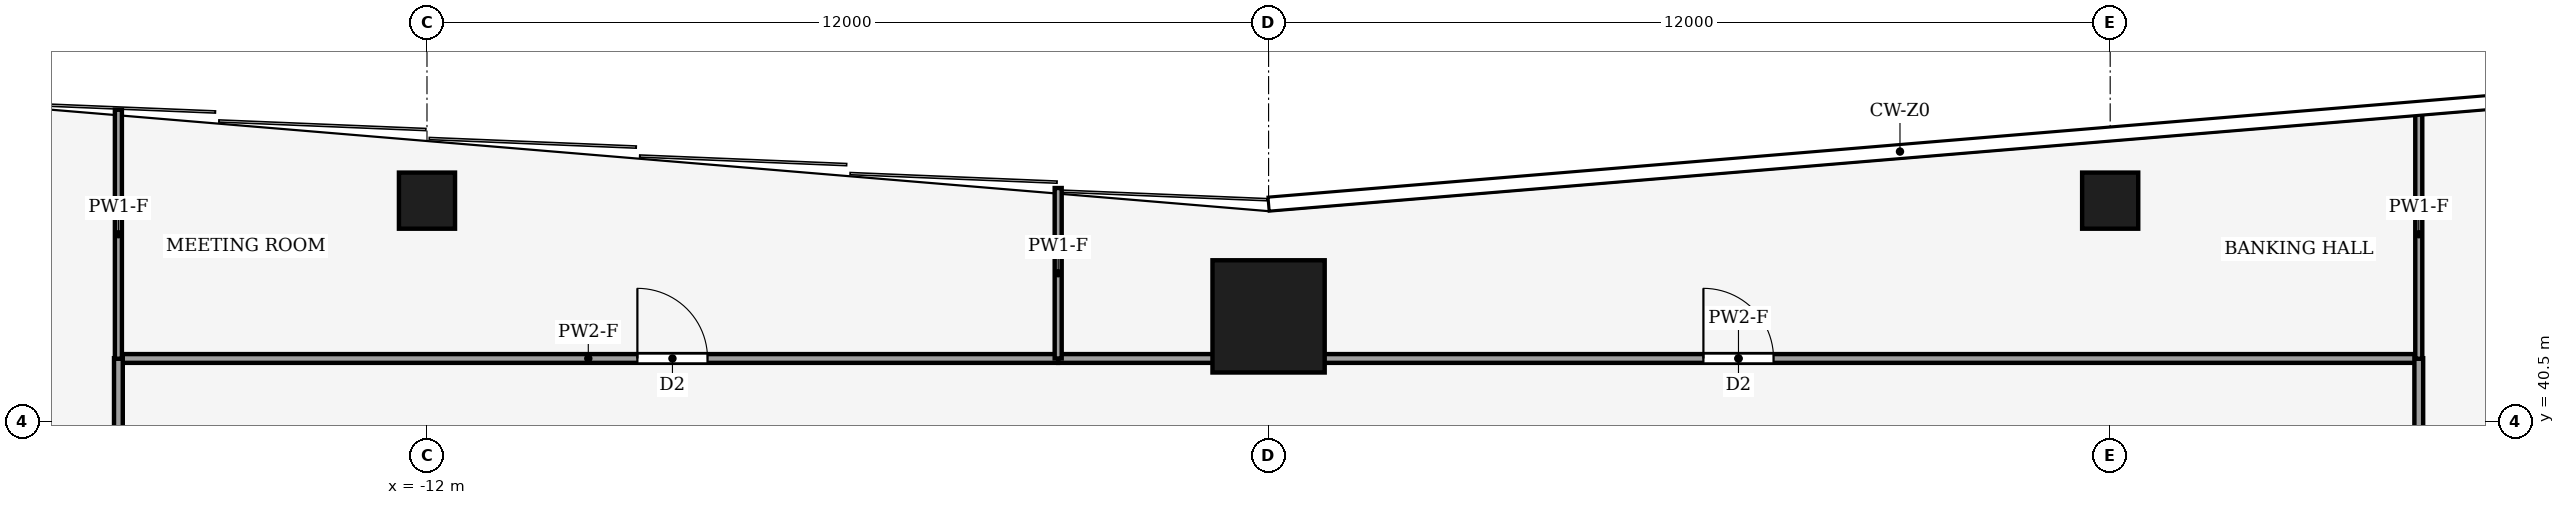
"""IFC4 building model, lengths in metres.
Left out: names, types, materials, properties, quantities, classifications, styles, units other than length and angle.
Written with IfcOpenShell. Run it as: python <this file> out.ifc"""

import sys

from ifc_helpers import new_model, si_unit, direction, frame, frame_2d, origin, origin_2d, place, context, subcontext, project, spatial, rectangle, hollow_rectangle, extrude, element, fill, save


model = new_model("IFC4")
c1 = context("Model", 3, precision=1e-05, world=origin(), true_north=direction((0.0, 1.0)))
c2 = subcontext(c1, "Body", "Model", "MODEL_VIEW")
j1 = project(units=[si_unit("LENGTHUNIT", "METRE"), si_unit("PLANEANGLEUNIT", "RADIAN")], contexts=[c1])
p1 = place(None, origin())
s1 = spatial("IfcSite", under=j1, at=p1, CompositionType="ELEMENT")
p2 = place(p1, origin())
s2 = spatial("IfcBuilding", under=s1, at=p2, CompositionType="ELEMENT")
p3 = place(p2, frame((0.0, 0.0, 22.0)))
s3 = spatial("IfcBuildingStorey", under=s2, at=p3, CompositionType="ELEMENT", Elevation=22.0)
p4 = place(p3, frame((0.0, 42.0, 0.0), z_axis=(0.0, 0.0, 1.0), x_axis=(1.0, 0.0, 0.0)))
e1 = element("IfcColumn", 1, at=p4, inside=s3, PredefinedType="COLUMN", context=c2, shape_type="SweptSolid", body=[
    extrude(hollow_rectangle(XDim=1.6, YDim=1.6, WallThickness=0.09, at=origin_2d()), origin(), (0.0, 0.0, 1.0), 4.0),
])
for number, where, z_axis, x_axis in (
    (2, (-12.0, 43.65, 0.0), (0.0, 0.0, 1.0), (1.0, 0.0, 0.0)),
    (3, (12.0, 43.65, 0.0), (0.0, 0.0, 1.0), (1.0, 0.0, 0.0)),
):
    element("IfcColumn", number, at=place(p3, frame(where, z_axis=z_axis, x_axis=x_axis)), inside=s3, PredefinedType="COLUMN", context=c2, shape_type="SweptSolid", body=[
        extrude(hollow_rectangle(XDim=0.8, YDim=0.8, WallThickness=0.04, at=origin_2d()), origin(), (0.0, 0.0, 1.0), 4.0),
    ])
p5 = place(p3, frame((-16.4, 41.4, 0.0), z_axis=(0.0, 0.0, 1.0), x_axis=(1.0, 0.0, 0.0)))
e4 = element("IfcWall", 4, at=p5, inside=s3, PredefinedType="PARTITIONING", context=c2, shape_type="SweptSolid", body=[
    extrude(rectangle(XDim=13.4, YDim=0.125, at=frame_2d((6.7, 0.0))), origin(), (0.0, 0.0, 1.0), 3.54),
])
p6 = place(p5, frame((7.4, 0.0, 0.0)))
e5 = element("IfcOpeningElement", 5, at=p6, cuts=e4, PredefinedType="OPENING", context=c2, shape_type="SweptSolid", body=[
    extrude(rectangle(XDim=1.0, YDim=2.1, at=frame_2d((0.5, 1.05))), frame((0.0, 0.073, 0.0), z_axis=(0.0, -1.0, 0.0), x_axis=(1.0, 0.0, 0.0)), (0.0, 0.0, 1.0), 0.145),
])
p7 = place(p3, frame((-3.0, 41.4, 0.0), z_axis=(0.0, 0.0, 1.0), x_axis=(1.0, 0.0, 0.0)))
e6 = element("IfcWall", 6, at=p7, inside=s3, PredefinedType="PARTITIONING", context=c2, shape_type="SweptSolid", body=[
    extrude(rectangle(XDim=19.4, YDim=0.125, at=frame_2d((9.7, 0.0))), origin(), (0.0, 0.0, 1.0), 3.54),
])
p8 = place(p7, frame((9.2, 0.0, 0.0)))
e7 = element("IfcOpeningElement", 7, at=p8, cuts=e6, PredefinedType="OPENING", context=c2, shape_type="SweptSolid", body=[
    extrude(rectangle(XDim=1.0, YDim=2.1, at=frame_2d((0.5, 1.05))), frame((0.0, 0.073, 0.0), z_axis=(0.0, -1.0, 0.0), x_axis=(1.0, 0.0, 0.0)), (0.0, 0.0, 1.0), 0.145),
])
p9 = place(p3, frame((-16.4, 36.0, 0.0), z_axis=(0.0, 0.0, 1.0), x_axis=(0.0, 1.0, 0.0)))
e8 = element("IfcWall", 8, at=p9, inside=s3, PredefinedType="PARTITIONING", context=c2, shape_type="SweptSolid", body=[
    extrude(rectangle(XDim=5.404, YDim=0.125, at=frame_2d((2.702, 0.0))), origin(), (0.0, 0.0, 1.0), 3.14),
])
p10 = place(p9, frame((2.202, 0.0, 0.0)))
e9 = element("IfcOpeningElement", 9, at=p10, cuts=e8, PredefinedType="OPENING", context=c2, shape_type="SweptSolid", body=[
    extrude(rectangle(XDim=1.0, YDim=2.1, at=frame_2d((0.5, 1.05))), frame((0.0, 0.073, 0.0), z_axis=(0.0, -1.0, 0.0), x_axis=(1.0, 0.0, 0.0)), (0.0, 0.0, 1.0), 0.145),
])
p11 = place(p3, frame((16.4, 41.404, 0.0), z_axis=(0.0, 0.0, 1.0), x_axis=(0.0, -1.0, 0.0)))
e10 = element("IfcWall", 10, at=p11, inside=s3, PredefinedType="PARTITIONING", context=c2, shape_type="SweptSolid", body=[
    extrude(rectangle(XDim=8.404, YDim=0.125, at=frame_2d((4.202, 0.0))), origin(), (0.0, 0.0, 1.0), 3.14),
])
p12 = place(p11, frame((3.702, 0.0, 0.0)))
e11 = element("IfcOpeningElement", 11, at=p12, cuts=e10, PredefinedType="OPENING", context=c2, shape_type="SweptSolid", body=[
    extrude(rectangle(XDim=1.0, YDim=2.1, at=frame_2d((0.5, 1.05))), frame((0.0, 0.073, 0.0), z_axis=(0.0, -1.0, 0.0), x_axis=(1.0, 0.0, 0.0)), (0.0, 0.0, 1.0), 0.145),
])
p13 = place(p3, frame((-3.0, 41.4, 0.0), z_axis=(0.0, 0.0, 1.0), x_axis=(0.0, 1.0, 0.0)))
e12 = element("IfcWall", 12, at=p13, inside=s3, PredefinedType="PARTITIONING", context=c2, shape_type="SweptSolid", body=[
    extrude(rectangle(XDim=2.43, YDim=0.1, at=frame_2d((1.215, 0.0))), origin(), (0.0, 0.0, 1.0), 3.04),
])
for number, where, z_axis, x_axis in (
    (13, (-16.4, 44.947, 0.0), (0.0, 0.0, 1.0), (0.0, -1.0, 0.0)),
    (14, (16.4, 41.396, 0.0), (0.0, 0.0, 1.0), (0.0, 1.0, 0.0)),
):
    element("IfcWall", number, at=place(p3, frame(where, z_axis=z_axis, x_axis=x_axis)), inside=s3, PredefinedType="PARTITIONING", context=c2, shape_type="SweptSolid", body=[
        extrude(rectangle(XDim=3.551, YDim=0.1, at=frame_2d((1.775, 0.0))), origin(), (0.0, 0.0, 1.0), 3.04),
    ])
p14 = place(p6, origin())
e15 = element("IfcDoor", 15, at=p14, inside=s3, OperationType="SINGLE_SWING_RIGHT", PredefinedType="DOOR", context=c2, shape_type="SweptSolid", body=[
    extrude(rectangle(XDim=1.0, YDim=2.1, at=frame_2d((0.5, 1.05))), frame((0.0, 0.025, 0.0), z_axis=(0.0, -1.0, 0.0), x_axis=(1.0, 0.0, 0.0)), (0.0, 0.0, 1.0), 0.05),
])
fill(e5, e15)
p15 = place(p8, origin())
e16 = element("IfcDoor", 16, at=p15, inside=s3, OperationType="SINGLE_SWING_LEFT", PredefinedType="DOOR", context=c2, shape_type="SweptSolid", body=[
    extrude(rectangle(XDim=1.0, YDim=2.1, at=frame_2d((0.5, 1.05))), frame((0.0, 0.025, 0.0), z_axis=(0.0, -1.0, 0.0), x_axis=(1.0, 0.0, 0.0)), (0.0, 0.0, 1.0), 0.05),
])
fill(e7, e16)
save(model, sys.argv[1])
